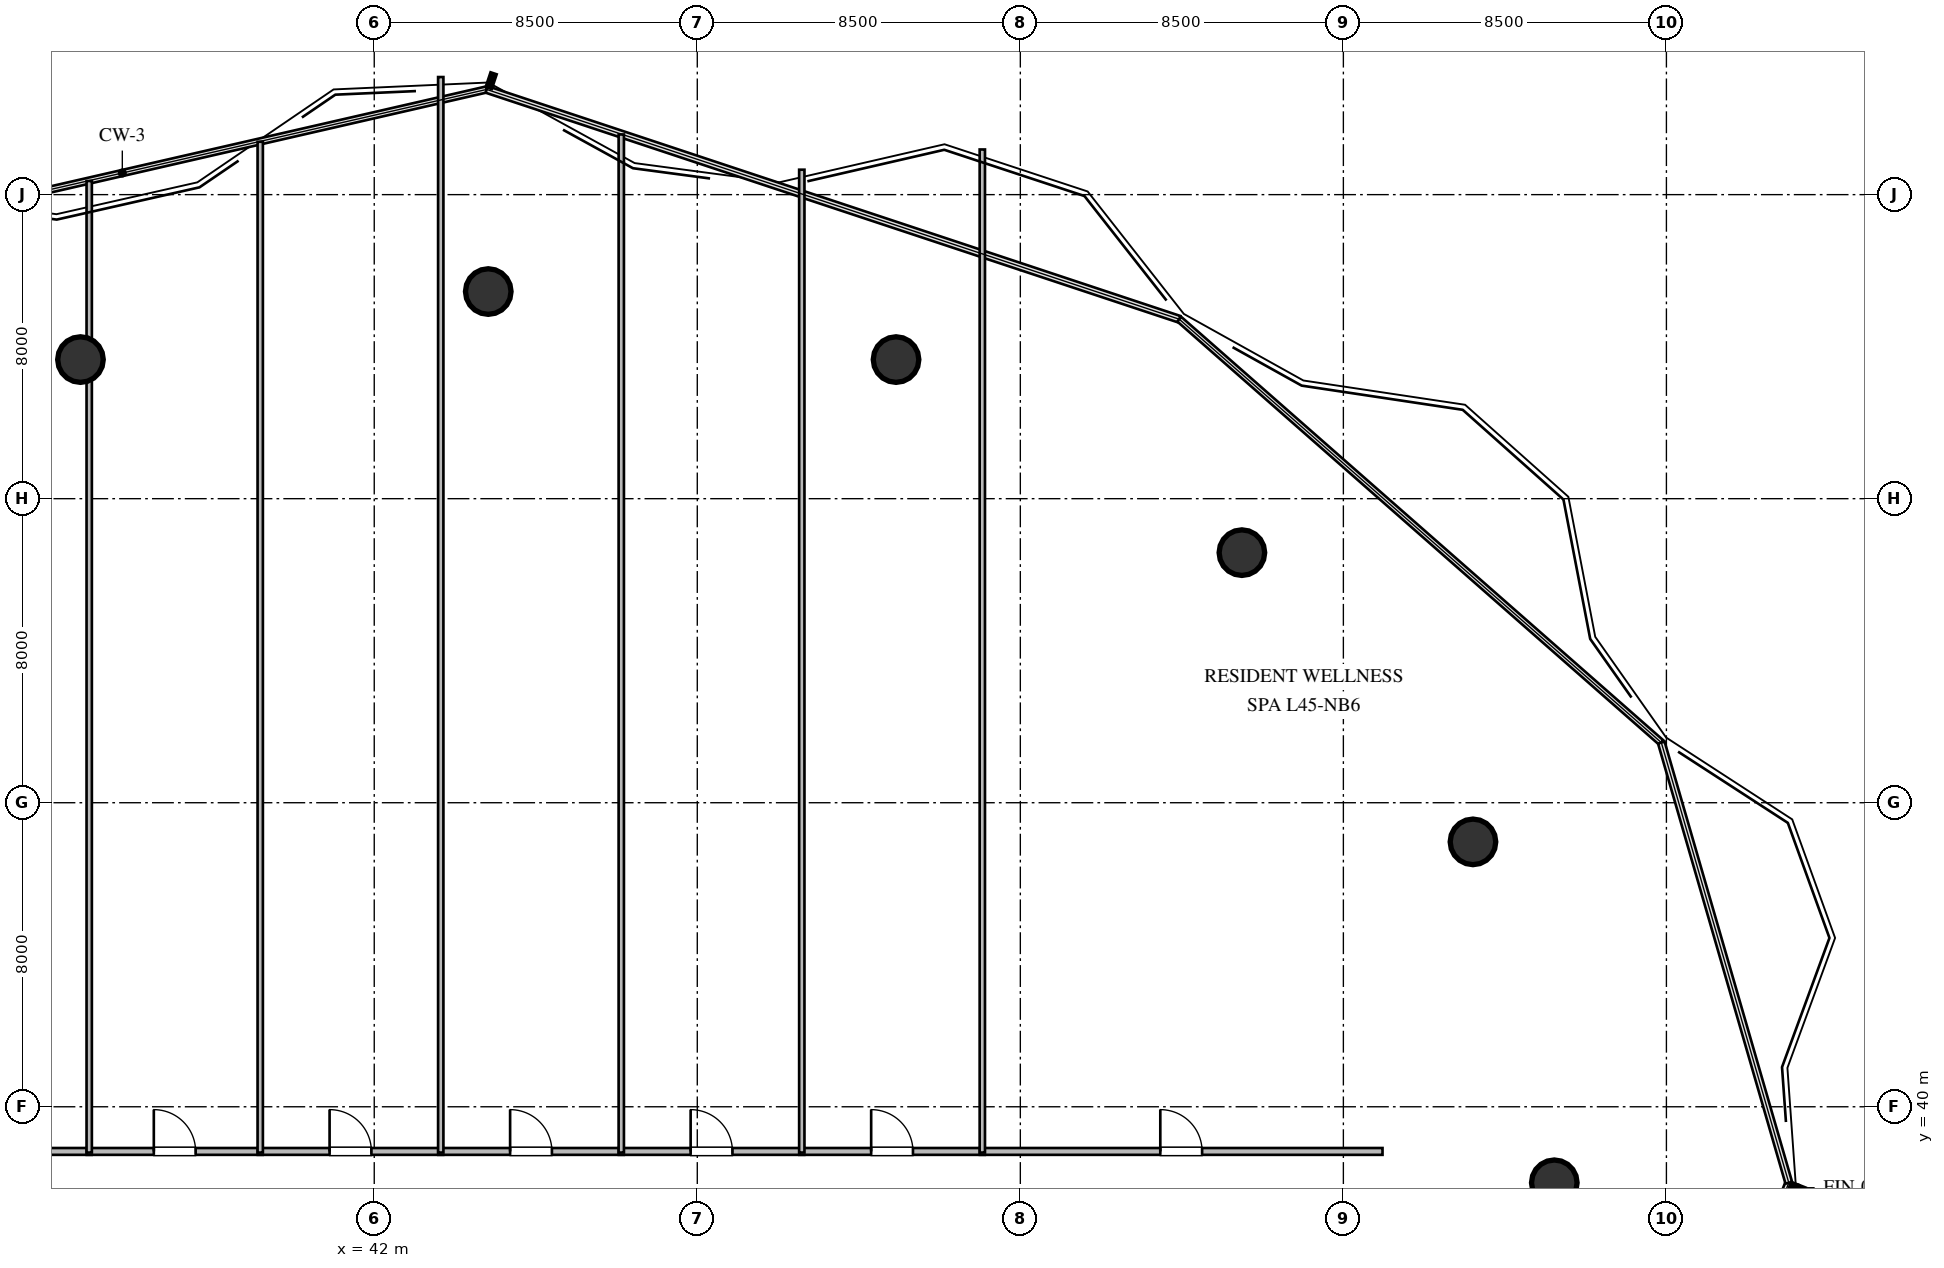
"""IFC4 building model, lengths in metres.
Left out: names, types, materials, properties, quantities, classifications, styles, units other than length and angle.
Written with IfcOpenShell. Run it as: python <this file> out.ifc"""

import sys

from ifc_helpers import new_model, si_unit, direction, frame, frame_2d, origin, origin_2d, place, context, subcontext, project, spatial, rectangle, circle, extrude, element, fill, save


model = new_model("IFC4")
c1 = context("Model", 3, precision=1e-05, world=origin(), true_north=direction((0.0, 1.0)))
c2 = subcontext(c1, "Body", "Model", "MODEL_VIEW")
j1 = project(units=[si_unit("LENGTHUNIT", "METRE"), si_unit("PLANEANGLEUNIT", "RADIAN")], contexts=[c1])
p1 = place(None, origin())
s1 = spatial("IfcSite", under=j1, at=p1, CompositionType="ELEMENT")
p2 = place(p1, origin())
s2 = spatial("IfcBuilding", under=s1, at=p2, CompositionType="ELEMENT")
p3 = place(p2, frame((0.0, 0.0, 171.0)))
s3 = spatial("IfcBuildingStorey", under=s2, at=p3, CompositionType="ELEMENT", Elevation=171.0)
for number, where, z_axis, x_axis in (
    (1, (73.05, 38.0, 0.0), (0.0, 0.0, 1.0), (1.0, 0.0, 0.0)),
    (2, (70.91, 46.97, 0.0), (0.0, 0.0, 1.0), (1.0, 0.0, 0.0)),
    (3, (64.83, 54.58, 0.0), (0.0, 0.0, 1.0), (1.0, 0.0, 0.0)),
    (4, (55.73, 59.66, 0.0), (0.0, 0.0, 1.0), (1.0, 0.0, 0.0)),
    (5, (45.0, 61.45, 0.0), (0.0, 0.0, 1.0), (1.0, 0.0, 0.0)),
    (6, (34.27, 59.66, 0.0), (0.0, 0.0, 1.0), (1.0, 0.0, 0.0)),
):
    element("IfcColumn", number, at=place(p3, frame(where, z_axis=z_axis, x_axis=x_axis)), inside=s3, PredefinedType="COLUMN", context=c2, shape_type="SweptSolid", body=[
        extrude(circle(Radius=0.6, at=origin_2d()), origin(), (0.0, 0.0, 1.0), 3.6),
    ])
p4 = place(p3, frame((29.935, 38.825, 0.0), z_axis=(0.0, 0.0, 1.0), x_axis=(1.0, 0.0, 0.0)))
e7 = element("IfcWall", 7, at=p4, inside=s3, PredefinedType="PARTITIONING", context=c2, shape_type="SweptSolid", body=[
    extrude(rectangle(XDim=4.63, YDim=0.18, at=frame_2d((2.315, 0.0))), origin(), (0.0, 0.0, 1.0), 3.36),
])
p5 = place(p4, frame((1.765, 0.0, 0.0)))
e8 = element("IfcOpeningElement", 8, at=p5, cuts=e7, PredefinedType="OPENING", context=c2, shape_type="SweptSolid", body=[
    extrude(rectangle(XDim=1.1, YDim=2.1, at=frame_2d((0.55, 1.05))), frame((0.0, 0.1, 0.0), z_axis=(0.0, -1.0, 0.0), x_axis=(1.0, 0.0, 0.0)), (0.0, 0.0, 1.0), 0.2),
])
p6 = place(p3, frame((34.435, 38.825, 0.0), z_axis=(0.0, 0.0, 1.0), x_axis=(1.0, 0.0, 0.0)))
e9 = element("IfcWall", 9, at=p6, inside=s3, PredefinedType="PARTITIONING", context=c2, shape_type="SweptSolid", body=[
    extrude(rectangle(XDim=4.63, YDim=0.18, at=frame_2d((2.315, 0.0))), origin(), (0.0, 0.0, 1.0), 3.36),
])
p7 = place(p6, frame((1.765, 0.0, 0.0)))
e10 = element("IfcOpeningElement", 10, at=p7, cuts=e9, PredefinedType="OPENING", context=c2, shape_type="SweptSolid", body=[
    extrude(rectangle(XDim=1.1, YDim=2.1, at=frame_2d((0.55, 1.05))), frame((0.0, 0.1, 0.0), z_axis=(0.0, -1.0, 0.0), x_axis=(1.0, 0.0, 0.0)), (0.0, 0.0, 1.0), 0.2),
])
p8 = place(p3, frame((38.935, 38.825, 0.0), z_axis=(0.0, 0.0, 1.0), x_axis=(1.0, 0.0, 0.0)))
e11 = element("IfcWall", 11, at=p8, inside=s3, PredefinedType="PARTITIONING", context=c2, shape_type="SweptSolid", body=[
    extrude(rectangle(XDim=4.88, YDim=0.18, at=frame_2d((2.44, 0.0))), origin(), (0.0, 0.0, 1.0), 3.36),
])
p9 = place(p8, frame((1.89, 0.0, 0.0)))
e12 = element("IfcOpeningElement", 12, at=p9, cuts=e11, PredefinedType="OPENING", context=c2, shape_type="SweptSolid", body=[
    extrude(rectangle(XDim=1.1, YDim=2.1, at=frame_2d((0.55, 1.05))), frame((0.0, 0.1, 0.0), z_axis=(0.0, -1.0, 0.0), x_axis=(1.0, 0.0, 0.0)), (0.0, 0.0, 1.0), 0.2),
])
p10 = place(p3, frame((43.685, 38.825, 0.0), z_axis=(0.0, 0.0, 1.0), x_axis=(1.0, 0.0, 0.0)))
e13 = element("IfcWall", 13, at=p10, inside=s3, PredefinedType="PARTITIONING", context=c2, shape_type="SweptSolid", body=[
    extrude(rectangle(XDim=4.88, YDim=0.18, at=frame_2d((2.44, 0.0))), origin(), (0.0, 0.0, 1.0), 3.36),
])
p11 = place(p10, frame((1.89, 0.0, 0.0)))
e14 = element("IfcOpeningElement", 14, at=p11, cuts=e13, PredefinedType="OPENING", context=c2, shape_type="SweptSolid", body=[
    extrude(rectangle(XDim=1.1, YDim=2.1, at=frame_2d((0.55, 1.05))), frame((0.0, 0.1, 0.0), z_axis=(0.0, -1.0, 0.0), x_axis=(1.0, 0.0, 0.0)), (0.0, 0.0, 1.0), 0.2),
])
p12 = place(p3, frame((48.435, 38.825, 0.0), z_axis=(0.0, 0.0, 1.0), x_axis=(1.0, 0.0, 0.0)))
e15 = element("IfcWall", 15, at=p12, inside=s3, PredefinedType="PARTITIONING", context=c2, shape_type="SweptSolid", body=[
    extrude(rectangle(XDim=4.88, YDim=0.18, at=frame_2d((2.44, 0.0))), origin(), (0.0, 0.0, 1.0), 3.36),
])
p13 = place(p12, frame((1.89, 0.0, 0.0)))
e16 = element("IfcOpeningElement", 16, at=p13, cuts=e15, PredefinedType="OPENING", context=c2, shape_type="SweptSolid", body=[
    extrude(rectangle(XDim=1.1, YDim=2.1, at=frame_2d((0.55, 1.05))), frame((0.0, 0.1, 0.0), z_axis=(0.0, -1.0, 0.0), x_axis=(1.0, 0.0, 0.0)), (0.0, 0.0, 1.0), 0.2),
])
p14 = place(p3, frame((53.185, 38.825, 0.0), z_axis=(0.0, 0.0, 1.0), x_axis=(1.0, 0.0, 0.0)))
e17 = element("IfcWall", 17, at=p14, inside=s3, PredefinedType="PARTITIONING", context=c2, shape_type="SweptSolid", body=[
    extrude(rectangle(XDim=4.88, YDim=0.18, at=frame_2d((2.44, 0.0))), origin(), (0.0, 0.0, 1.0), 3.36),
])
p15 = place(p14, frame((1.89, 0.0, 0.0)))
e18 = element("IfcOpeningElement", 18, at=p15, cuts=e17, PredefinedType="OPENING", context=c2, shape_type="SweptSolid", body=[
    extrude(rectangle(XDim=1.1, YDim=2.1, at=frame_2d((0.55, 1.05))), frame((0.0, 0.1, 0.0), z_axis=(0.0, -1.0, 0.0), x_axis=(1.0, 0.0, 0.0)), (0.0, 0.0, 1.0), 0.2),
])
p16 = place(p3, frame((57.935, 38.825, 0.0), z_axis=(0.0, 0.0, 1.0), x_axis=(1.0, 0.0, 0.0)))
e19 = element("IfcWall", 19, at=p16, inside=s3, PredefinedType="PARTITIONING", context=c2, shape_type="SweptSolid", body=[
    extrude(rectangle(XDim=10.595, YDim=0.18, at=frame_2d((5.297, 0.0))), origin(), (0.0, 0.0, 1.0), 3.36),
])
p17 = place(p16, frame((4.748, 0.0, 0.0)))
e20 = element("IfcOpeningElement", 20, at=p17, cuts=e19, PredefinedType="OPENING", context=c2, shape_type="SweptSolid", body=[
    extrude(rectangle(XDim=1.1, YDim=2.1, at=frame_2d((0.55, 1.05))), frame((0.0, 0.1, 0.0), z_axis=(0.0, -1.0, 0.0), x_axis=(1.0, 0.0, 0.0)), (0.0, 0.0, 1.0), 0.2),
])
p18 = place(p3, frame((34.5, 64.359, 0.0), z_axis=(0.0, 0.0, 1.0), x_axis=(0.0, -1.0, 0.0)))
e21 = element("IfcWall", 21, at=p18, inside=s3, PredefinedType="PARTITIONING", context=c2, shape_type="SweptSolid", body=[
    extrude(rectangle(XDim=25.564, YDim=0.14, at=frame_2d((12.782, 0.0))), origin(), (0.0, 0.0, 1.0), 2.89),
])
p19 = place(p3, frame((39.0, 65.391, 0.0), z_axis=(0.0, 0.0, 1.0), x_axis=(0.0, -1.0, 0.0)))
e22 = element("IfcWall", 22, at=p19, inside=s3, PredefinedType="PARTITIONING", context=c2, shape_type="SweptSolid", body=[
    extrude(rectangle(XDim=26.596, YDim=0.14, at=frame_2d((13.298, 0.0))), origin(), (0.0, 0.0, 1.0), 3.36),
])
p20 = place(p3, frame((43.75, 67.094, 0.0), z_axis=(0.0, 0.0, 1.0), x_axis=(0.0, -1.0, 0.0)))
e23 = element("IfcWall", 23, at=p20, inside=s3, PredefinedType="PARTITIONING", context=c2, shape_type="SweptSolid", body=[
    extrude(rectangle(XDim=28.299, YDim=0.14, at=frame_2d((14.149, 0.0))), origin(), (0.0, 0.0, 1.0), 2.89),
])
p21 = place(p3, frame((48.5, 65.583, 0.0), z_axis=(0.0, 0.0, 1.0), x_axis=(0.0, -1.0, 0.0)))
e24 = element("IfcWall", 24, at=p21, inside=s3, PredefinedType="PARTITIONING", context=c2, shape_type="SweptSolid", body=[
    extrude(rectangle(XDim=26.788, YDim=0.14, at=frame_2d((13.394, 0.0))), origin(), (0.0, 0.0, 1.0), 3.36),
])
p22 = place(p3, frame((53.25, 64.656, 0.0), z_axis=(0.0, 0.0, 1.0), x_axis=(0.0, -1.0, 0.0)))
e25 = element("IfcWall", 25, at=p22, inside=s3, PredefinedType="PARTITIONING", context=c2, shape_type="SweptSolid", body=[
    extrude(rectangle(XDim=25.861, YDim=0.14, at=frame_2d((12.931, 0.0))), origin(), (0.0, 0.0, 1.0), 3.36),
])
p23 = place(p3, frame((58.0, 65.188, 0.0), z_axis=(0.0, 0.0, 1.0), x_axis=(0.0, -1.0, 0.0)))
e26 = element("IfcWall", 26, at=p23, inside=s3, PredefinedType="PARTITIONING", context=c2, shape_type="SweptSolid", body=[
    extrude(rectangle(XDim=26.393, YDim=0.14, at=frame_2d((13.197, 0.0))), origin(), (0.0, 0.0, 1.0), 3.36),
])
p24 = place(p7, origin())
e27 = element("IfcDoor", 27, at=p24, inside=s3, OperationType="SINGLE_SWING_LEFT", PredefinedType="DOOR", context=c2, shape_type="SweptSolid", body=[
    extrude(rectangle(XDim=1.1, YDim=2.1, at=frame_2d((0.55, 1.05))), frame((0.0, 0.025, 0.0), z_axis=(0.0, -1.0, 0.0), x_axis=(1.0, 0.0, 0.0)), (0.0, 0.0, 1.0), 0.05),
])
fill(e10, e27)
p25 = place(p9, origin())
e28 = element("IfcDoor", 28, at=p25, inside=s3, OperationType="SINGLE_SWING_LEFT", PredefinedType="DOOR", context=c2, shape_type="SweptSolid", body=[
    extrude(rectangle(XDim=1.1, YDim=2.1, at=frame_2d((0.55, 1.05))), frame((0.0, 0.025, 0.0), z_axis=(0.0, -1.0, 0.0), x_axis=(1.0, 0.0, 0.0)), (0.0, 0.0, 1.0), 0.05),
])
fill(e12, e28)
p26 = place(p11, origin())
e29 = element("IfcDoor", 29, at=p26, inside=s3, OperationType="SINGLE_SWING_LEFT", PredefinedType="DOOR", context=c2, shape_type="SweptSolid", body=[
    extrude(rectangle(XDim=1.1, YDim=2.1, at=frame_2d((0.55, 1.05))), frame((0.0, 0.025, 0.0), z_axis=(0.0, -1.0, 0.0), x_axis=(1.0, 0.0, 0.0)), (0.0, 0.0, 1.0), 0.05),
])
fill(e14, e29)
p27 = place(p13, origin())
e30 = element("IfcDoor", 30, at=p27, inside=s3, OperationType="SINGLE_SWING_LEFT", PredefinedType="DOOR", context=c2, shape_type="SweptSolid", body=[
    extrude(rectangle(XDim=1.1, YDim=2.1, at=frame_2d((0.55, 1.05))), frame((0.0, 0.025, 0.0), z_axis=(0.0, -1.0, 0.0), x_axis=(1.0, 0.0, 0.0)), (0.0, 0.0, 1.0), 0.05),
])
fill(e16, e30)
p28 = place(p15, origin())
e31 = element("IfcDoor", 31, at=p28, inside=s3, OperationType="SINGLE_SWING_LEFT", PredefinedType="DOOR", context=c2, shape_type="SweptSolid", body=[
    extrude(rectangle(XDim=1.1, YDim=2.1, at=frame_2d((0.55, 1.05))), frame((0.0, 0.025, 0.0), z_axis=(0.0, -1.0, 0.0), x_axis=(1.0, 0.0, 0.0)), (0.0, 0.0, 1.0), 0.05),
])
fill(e18, e31)
p29 = place(p17, origin())
e32 = element("IfcDoor", 32, at=p29, inside=s3, OperationType="SINGLE_SWING_LEFT", PredefinedType="DOOR", context=c2, shape_type="SweptSolid", body=[
    extrude(rectangle(XDim=1.1, YDim=2.1, at=frame_2d((0.55, 1.05))), frame((0.0, 0.025, 0.0), z_axis=(0.0, -1.0, 0.0), x_axis=(1.0, 0.0, 0.0)), (0.0, 0.0, 1.0), 0.05),
])
fill(e20, e32)
save(model, sys.argv[1])
